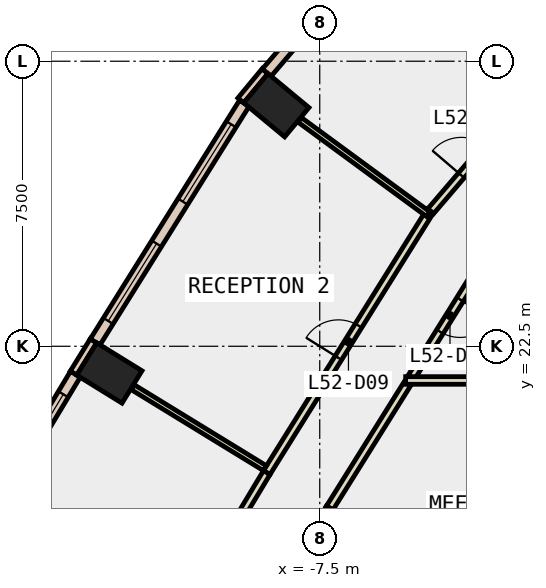
"""IFC4 building model, lengths in metres.
Left out: names, types, materials, properties, quantities, classifications, styles, units other than length and angle.
Written with IfcOpenShell. Run it as: python <this file> out.ifc"""

import sys

from ifc_helpers import new_model, si_unit, direction, frame, frame_2d, origin, origin_2d, place, context, subcontext, project, spatial, rectangle, extrude, element, fill, save


model = new_model("IFC4")
c1 = context("Model", 3, precision=1e-05, world=origin(), true_north=direction((0.0, 1.0)))
c2 = subcontext(c1, "Body", "Model", "MODEL_VIEW")
j1 = project(units=[si_unit("LENGTHUNIT", "METRE"), si_unit("PLANEANGLEUNIT", "RADIAN")], contexts=[c1])
p1 = place(None, origin())
s1 = spatial("IfcSite", under=j1, at=p1, CompositionType="ELEMENT")
p2 = place(p1, origin())
s2 = spatial("IfcBuilding", under=s1, at=p2, CompositionType="ELEMENT")
p3 = place(p2, frame((0.0, 0.0, 231.8)))
s3 = spatial("IfcBuildingStorey", under=s2, at=p3, CompositionType="ELEMENT", Elevation=231.8)
for number, where, z_axis, x_axis in (
    (1, (-8.642, 28.842, -0.4), (0.0, 0.0, 1.0), (0.639, 0.769, 0.0)),
    (2, (-13.036, 21.797, -0.4), (0.0, 0.0, 1.0), (0.525, 0.851, 0.0)),
):
    element("IfcColumn", number, at=place(p3, frame(where, z_axis=z_axis, x_axis=x_axis)), inside=s3, PredefinedType="COLUMN", context=c2, shape_type="SweptSolid", body=[
        extrude(rectangle(XDim=1.0, YDim=1.4, at=origin_2d()), origin(), (0.0, 0.0, 1.0), 4.0),
    ])
p4 = place(p3, frame((-8.939, 29.738, 0.0), z_axis=(0.0, 0.0, 1.0), x_axis=(-0.637972365578, -0.770059257953, 0.0)))
e3 = element("IfcWall", 3, at=p4, inside=s3, PredefinedType="STANDARD", context=c2, shape_type="SweptSolid", body=[
    extrude(rectangle(XDim=1.0, YDim=0.2, at=frame_2d((0.5, 0.0))), origin(), (0.0, 0.0, 1.0), 3.6),
])
p5 = place(p3, frame((-13.454, 22.643, 0.0), z_axis=(0.0, 0.0, 1.0), x_axis=(-0.525648735675, -0.850701714282, 0.0)))
e4 = element("IfcWall", 4, at=p5, inside=s3, PredefinedType="STANDARD", context=c2, shape_type="SweptSolid", body=[
    extrude(rectangle(XDim=1.0, YDim=0.2, at=frame_2d((0.5, 0.0))), origin(), (0.0, 0.0, 1.0), 3.6),
])
p6 = place(p3, frame((-5.975, 33.114, 0.0), z_axis=(0.0, 0.0, 1.0), x_axis=(-0.649967502437, -0.75996200285, 0.0)))
e5 = element("IfcWall", 5, at=p6, inside=s3, PredefinedType="STANDARD", context=c2, shape_type="SweptSolid", body=[
    extrude(rectangle(XDim=4.492, YDim=0.3, at=frame_2d((2.246, 0.0))), origin(), (0.0, 0.0, 1.0), 3.6),
])
p7 = place(p6, frame((1.546, 0.0, 0.9)))
e6 = element("IfcOpeningElement", 6, at=p7, cuts=e5, PredefinedType="OPENING", context=c2, shape_type="SweptSolid", body=[
    extrude(rectangle(XDim=1.4, YDim=2.6, at=frame_2d((0.7, 1.3))), frame((0.0, 0.16, 0.0), z_axis=(0.0, -1.0, 0.0), x_axis=(1.0, 0.0, 0.0)), (0.0, 0.0, 1.0), 0.32),
])
p8 = place(p3, frame((-9.485, 28.893, 0.0), z_axis=(0.0, 0.0, 1.0), x_axis=(-0.530037467052, -0.847974223383, 0.0)))
e7 = element("IfcWall", 7, at=p8, inside=s3, PredefinedType="STANDARD", context=c2, shape_type="SweptSolid", body=[
    extrude(rectangle(XDim=7.405, YDim=0.3, at=frame_2d((3.702, 0.0))), origin(), (0.0, 0.0, 1.0), 3.6),
])
p9 = place(p8, frame((0.651, 0.0, 0.9)))
e8 = element("IfcOpeningElement", 8, at=p9, cuts=e7, PredefinedType="OPENING", context=c2, shape_type="SweptSolid", body=[
    extrude(rectangle(XDim=2.4, YDim=2.6, at=frame_2d((1.2, 1.3))), frame((0.0, 0.16, 0.0), z_axis=(0.0, -1.0, 0.0), x_axis=(1.0, 0.0, 0.0)), (0.0, 0.0, 1.0), 0.32),
])
p10 = place(p8, frame((4.354, 0.0, 0.9)))
e9 = element("IfcOpeningElement", 9, at=p10, cuts=e7, PredefinedType="OPENING", context=c2, shape_type="SweptSolid", body=[
    extrude(rectangle(XDim=2.4, YDim=2.6, at=frame_2d((1.2, 1.3))), frame((0.0, 0.16, 0.0), z_axis=(0.0, -1.0, 0.0), x_axis=(1.0, 0.0, 0.0)), (0.0, 0.0, 1.0), 0.32),
])
p11 = place(p3, frame((-13.931, 21.763, 0.0), z_axis=(0.0, 0.0, 1.0), x_axis=(-0.515049705348, -0.857160312323, 0.0)))
e10 = element("IfcWall", 10, at=p11, inside=s3, PredefinedType="STANDARD", context=c2, shape_type="SweptSolid", body=[
    extrude(rectangle(XDim=7.258, YDim=0.3, at=frame_2d((3.629, 0.0))), origin(), (0.0, 0.0, 1.0), 3.6),
])
p12 = place(p11, frame((0.614, 0.0, 0.9)))
e11 = element("IfcOpeningElement", 11, at=p12, cuts=e10, PredefinedType="OPENING", context=c2, shape_type="SweptSolid", body=[
    extrude(rectangle(XDim=2.4, YDim=2.6, at=frame_2d((1.2, 1.3))), frame((0.0, 0.16, 0.0), z_axis=(0.0, -1.0, 0.0), x_axis=(1.0, 0.0, 0.0)), (0.0, 0.0, 1.0), 0.32),
])
p13 = place(p11, frame((4.243, 0.0, 0.9)))
e12 = element("IfcOpeningElement", 12, at=p13, cuts=e10, PredefinedType="OPENING", context=c2, shape_type="SweptSolid", body=[
    extrude(rectangle(XDim=2.4, YDim=2.6, at=frame_2d((1.2, 1.3))), frame((0.0, 0.16, 0.0), z_axis=(0.0, -1.0, 0.0), x_axis=(1.0, 0.0, 0.0)), (0.0, 0.0, 1.0), 0.32),
])
p14 = place(p3, frame((-5.193, 21.515, 0.0), z_axis=(0.0, 0.0, 1.0), x_axis=(-0.530175390862, -0.847887996686, 0.0)))
e13 = element("IfcWall", 13, at=p14, inside=s3, PredefinedType="PARTITIONING", context=c2, shape_type="SweptSolid", body=[
    extrude(rectangle(XDim=3.855, YDim=0.2, at=frame_2d((1.928, 0.0))), origin(), (0.0, 0.0, 1.0), 3.6),
])
p15 = place(p3, frame((-7.237, 18.246, 0.0), z_axis=(0.0, 0.0, 1.0), x_axis=(-0.514959644878, -0.857214421336, 0.0)))
e14 = element("IfcWall", 14, at=p15, inside=s3, PredefinedType="PARTITIONING", context=c2, shape_type="SweptSolid", body=[
    extrude(rectangle(XDim=4.179, YDim=0.2, at=frame_2d((2.089, 0.0))), origin(), (0.0, 0.0, 1.0), 3.6),
])
p16 = place(p15, frame((1.589, 0.0, 0.0)))
e15 = element("IfcOpeningElement", 15, at=p16, cuts=e14, PredefinedType="OPENING", context=c2, shape_type="SweptSolid", body=[
    extrude(rectangle(XDim=1.0, YDim=2.1, at=frame_2d((0.5, 1.05))), frame((0.0, 0.11, 0.0), z_axis=(0.0, -1.0, 0.0), x_axis=(1.0, 0.0, 0.0)), (0.0, 0.0, 1.0), 0.22),
])
p17 = place(p3, frame((-3.057, 24.933, 0.0), z_axis=(0.0, 0.0, 1.0), x_axis=(-0.529998940003, -0.847998304005, 0.0)))
e16 = element("IfcWall", 16, at=p17, inside=s3, PredefinedType="PARTITIONING", context=c2, shape_type="SweptSolid", body=[
    extrude(rectangle(XDim=3.83, YDim=0.2, at=frame_2d((1.915, 0.0))), origin(), (0.0, 0.0, 1.0), 3.6),
])
p18 = place(p17, frame((1.416, 0.0, 0.0)))
e17 = element("IfcOpeningElement", 17, at=p18, cuts=e16, PredefinedType="OPENING", context=c2, shape_type="SweptSolid", body=[
    extrude(rectangle(XDim=1.0, YDim=2.1, at=frame_2d((0.5, 1.05))), frame((0.0, 0.11, 0.0), z_axis=(0.0, -1.0, 0.0), x_axis=(1.0, 0.0, 0.0)), (0.0, 0.0, 1.0), 0.22),
])
p19 = place(p3, frame((-4.581, 26.052, 0.0), z_axis=(0.0, 0.0, 1.0), x_axis=(0.650040973726, 0.759899159413, 0.0)))
e18 = element("IfcWall", 18, at=p19, inside=s3, PredefinedType="PARTITIONING", context=c2, shape_type="SweptSolid", body=[
    extrude(rectangle(XDim=3.485, YDim=0.2, at=frame_2d((1.742, 0.0))), origin(), (0.0, 0.0, 1.0), 3.6),
])
p20 = place(p19, frame((1.243, 0.0, 0.0)))
e19 = element("IfcOpeningElement", 19, at=p20, cuts=e18, PredefinedType="OPENING", context=c2, shape_type="SweptSolid", body=[
    extrude(rectangle(XDim=1.0, YDim=2.1, at=frame_2d((0.5, 1.05))), frame((0.0, 0.11, 0.0), z_axis=(0.0, -1.0, 0.0), x_axis=(1.0, 0.0, 0.0)), (0.0, 0.0, 1.0), 0.22),
])
p21 = place(p3, frame((-8.896, 19.176, 0.0), z_axis=(0.0, 0.0, 1.0), x_axis=(0.529985425286, 0.848006750553, 0.0)))
e20 = element("IfcWall", 20, at=p21, inside=s3, PredefinedType="PARTITIONING", context=c2, shape_type="SweptSolid", body=[
    extrude(rectangle(XDim=8.119, YDim=0.2, at=frame_2d((4.06, 0.0))), origin(), (0.0, 0.0, 1.0), 3.6),
])
p22 = place(p21, frame((3.56, 0.0, 0.0)))
e21 = element("IfcOpeningElement", 21, at=p22, cuts=e20, PredefinedType="OPENING", context=c2, shape_type="SweptSolid", body=[
    extrude(rectangle(XDim=1.0, YDim=2.1, at=frame_2d((0.5, 1.05))), frame((0.0, 0.11, 0.0), z_axis=(0.0, -1.0, 0.0), x_axis=(1.0, 0.0, 0.0)), (0.0, 0.0, 1.0), 0.22),
])
p23 = place(p3, frame((-13.057, 12.247, 0.0), z_axis=(0.0, 0.0, 1.0), x_axis=(0.51490435266, 0.857247634941, 0.0)))
e22 = element("IfcWall", 22, at=p23, inside=s3, PredefinedType="PARTITIONING", context=c2, shape_type="SweptSolid", body=[
    extrude(rectangle(XDim=8.083, YDim=0.2, at=frame_2d((4.042, 0.0))), origin(), (0.0, 0.0, 1.0), 3.6),
])
p24 = place(p23, frame((3.616, 0.0, 0.0)))
e23 = element("IfcOpeningElement", 23, at=p24, cuts=e22, PredefinedType="OPENING", context=c2, shape_type="SweptSolid", body=[
    extrude(rectangle(XDim=1.0, YDim=2.1, at=frame_2d((0.5, 1.05))), frame((0.0, 0.11, 0.0), z_axis=(0.0, -1.0, 0.0), x_axis=(1.0, 0.0, 0.0)), (0.0, 0.0, 1.0), 0.22),
])
p25 = place(p3, frame((-5.24, 21.6, 0.0), z_axis=(0.0, 0.0, 1.0), x_axis=(1.0, 0.0, 0.0)))
e24 = element("IfcWall", 24, at=p25, inside=s3, PredefinedType="PARTITIONING", context=c2, shape_type="SweptSolid", body=[
    extrude(rectangle(XDim=4.84, YDim=0.2, at=frame_2d((2.42, 0.0))), origin(), (0.0, 0.0, 1.0), 3.6),
])
p26 = place(p3, frame((-4.646, 25.976, 0.0), z_axis=(0.0, 0.0, 1.0), x_axis=(-0.806134630684, 0.591732166788, 0.0)))
e25 = element("IfcWall", 25, at=p26, inside=s3, PredefinedType="PARTITIONING", context=c2, shape_type="SweptSolid", body=[
    extrude(rectangle(XDim=4.193, YDim=0.15, at=frame_2d((2.096, 0.0))), origin(), (0.0, 0.0, 1.0), 3.6),
])
p27 = place(p3, frame((-8.942, 19.292, 0.0), z_axis=(0.0, 0.0, 1.0), x_axis=(-0.85273109234, 0.522350154739, 0.0)))
e26 = element("IfcWall", 26, at=p27, inside=s3, PredefinedType="PARTITIONING", context=c2, shape_type="SweptSolid", body=[
    extrude(rectangle(XDim=4.08, YDim=0.15, at=frame_2d((2.04, 0.0))), origin(), (0.0, 0.0, 1.0), 3.6),
])
p28 = place(p9, origin())
e27 = element("IfcWindow", 27, at=p28, inside=s3, PartitioningType="SINGLE_PANEL", PredefinedType="WINDOW", context=c2, shape_type="SweptSolid", body=[
    extrude(rectangle(XDim=2.4, YDim=2.6, at=frame_2d((1.2, 1.3))), frame((0.0, 0.03, 0.0), z_axis=(0.0, -1.0, 0.0), x_axis=(1.0, 0.0, 0.0)), (0.0, 0.0, 1.0), 0.06),
])
fill(e8, e27)
p29 = place(p10, origin())
e28 = element("IfcWindow", 28, at=p29, inside=s3, PartitioningType="SINGLE_PANEL", PredefinedType="WINDOW", context=c2, shape_type="SweptSolid", body=[
    extrude(rectangle(XDim=2.4, YDim=2.6, at=frame_2d((1.2, 1.3))), frame((0.0, 0.03, 0.0), z_axis=(0.0, -1.0, 0.0), x_axis=(1.0, 0.0, 0.0)), (0.0, 0.0, 1.0), 0.06),
])
fill(e9, e28)
p30 = place(p12, origin())
e29 = element("IfcWindow", 29, at=p30, inside=s3, PartitioningType="SINGLE_PANEL", PredefinedType="WINDOW", context=c2, shape_type="SweptSolid", body=[
    extrude(rectangle(XDim=2.4, YDim=2.6, at=frame_2d((1.2, 1.3))), frame((0.0, 0.03, 0.0), z_axis=(0.0, -1.0, 0.0), x_axis=(1.0, 0.0, 0.0)), (0.0, 0.0, 1.0), 0.06),
])
fill(e11, e29)
p31 = place(p20, origin())
e30 = element("IfcDoor", 30, at=p31, inside=s3, OperationType="SINGLE_SWING_LEFT", PredefinedType="DOOR", context=c2, shape_type="SweptSolid", body=[
    extrude(rectangle(XDim=1.0, YDim=2.1, at=frame_2d((0.5, 1.05))), frame((0.0, 0.025, 0.0), z_axis=(0.0, -1.0, 0.0), x_axis=(1.0, 0.0, 0.0)), (0.0, 0.0, 1.0), 0.05),
])
fill(e19, e30)
p32 = place(p22, origin())
e31 = element("IfcDoor", 31, at=p32, inside=s3, OperationType="SINGLE_SWING_LEFT", PredefinedType="DOOR", context=c2, shape_type="SweptSolid", body=[
    extrude(rectangle(XDim=1.0, YDim=2.1, at=frame_2d((0.5, 1.05))), frame((0.0, 0.025, 0.0), z_axis=(0.0, -1.0, 0.0), x_axis=(1.0, 0.0, 0.0)), (0.0, 0.0, 1.0), 0.05),
])
fill(e21, e31)
p33 = place(p18, origin())
e32 = element("IfcDoor", 32, at=p33, inside=s3, OperationType="SINGLE_SWING_LEFT", PredefinedType="DOOR", context=c2, shape_type="SweptSolid", body=[
    extrude(rectangle(XDim=1.0, YDim=2.1, at=frame_2d((0.5, 1.05))), frame((0.0, 0.025, 0.0), z_axis=(0.0, -1.0, 0.0), x_axis=(1.0, 0.0, 0.0)), (0.0, 0.0, 1.0), 0.05),
])
fill(e17, e32)
save(model, sys.argv[1])
